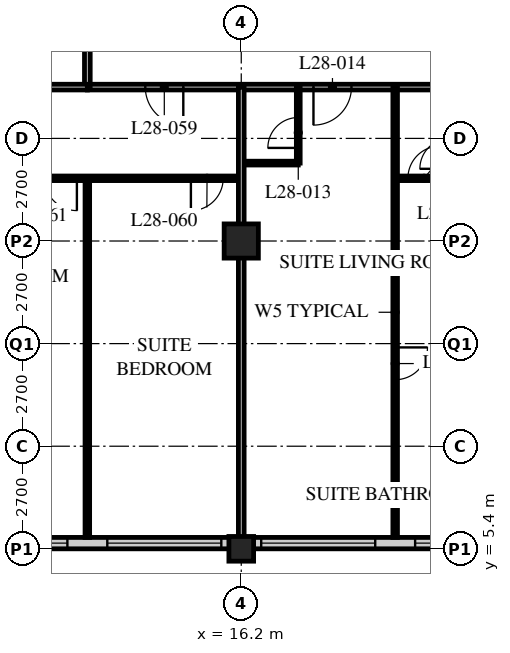
"""IFC4 building model, lengths in metres.
Left out: names, types, materials, properties, quantities, classifications, styles, units other than length and angle.
Written with IfcOpenShell. Run it as: python <this file> out.ifc"""

import sys

from ifc_helpers import new_model, si_unit, direction, frame, frame_2d, origin, origin_2d, place, context, subcontext, project, spatial, rectangle, hollow_rectangle, extrude, element, fill, save


model = new_model("IFC4")
c1 = context("Model", 3, precision=1e-05, world=origin(), true_north=direction((0.0, 1.0)))
c2 = subcontext(c1, "Body", "Model", "MODEL_VIEW")
j1 = project(units=[si_unit("LENGTHUNIT", "METRE"), si_unit("PLANEANGLEUNIT", "RADIAN")], contexts=[c1])
p1 = place(None, origin())
s1 = spatial("IfcSite", under=j1, at=p1, CompositionType="ELEMENT")
p2 = place(p1, origin())
s2 = spatial("IfcBuilding", under=s1, at=p2, CompositionType="ELEMENT")
p3 = place(p2, frame((0.0, 0.0, 113.6)))
s3 = spatial("IfcBuildingStorey", under=s2, at=p3, CompositionType="ELEMENT", Elevation=113.6)
p4 = place(p3, frame((16.2, 5.4, 0.0), z_axis=(0.0, 0.0, 1.0), x_axis=(1.0, 0.0, 0.0)))
e1 = element("IfcColumn", 1, at=p4, inside=s3, PredefinedType="COLUMN", context=c2, shape_type="SweptSolid", body=[
    extrude(hollow_rectangle(XDim=0.65, YDim=0.65, WallThickness=0.055, at=origin_2d()), origin(), (0.0, 0.0, 1.0), 3.4),
])
p5 = place(p3, frame((16.2, 13.5, 0.0), z_axis=(0.0, 0.0, 1.0), x_axis=(1.0, 0.0, 0.0)))
e2 = element("IfcColumn", 2, at=p5, inside=s3, PredefinedType="COLUMN", context=c2, shape_type="SweptSolid", body=[
    extrude(hollow_rectangle(XDim=0.9, YDim=0.9, WallThickness=0.09, at=origin_2d()), origin(), (0.0, 0.0, 1.0), 3.4),
])
p6 = place(p3, frame((8.4, 5.55, 0.0), z_axis=(0.0, 0.0, 1.0), x_axis=(1.0, 0.0, 0.0)))
e3 = element("IfcWall", 3, at=p6, inside=s3, PredefinedType="SOLIDWALL", context=c2, shape_type="SweptSolid", body=[
    extrude(rectangle(XDim=40.2, YDim=0.3, at=frame_2d((20.1, 0.0))), origin(), (0.0, 0.0, 1.0), 3.19),
])
p7 = place(p6, frame((0.225, 0.0, 0.9)))
e4 = element("IfcOpeningElement", 4, at=p7, cuts=e3, PredefinedType="OPENING", context=c2, shape_type="SweptSolid", body=[
    extrude(rectangle(XDim=3.0, YDim=2.0, at=frame_2d((1.5, 1.0))), frame((0.0, 0.16, 0.0), z_axis=(0.0, -1.0, 0.0), x_axis=(1.0, 0.0, 0.0)), (0.0, 0.0, 1.0), 0.32),
])
p8 = place(p6, frame((4.275, 0.0, 0.9)))
e5 = element("IfcOpeningElement", 5, at=p8, cuts=e3, PredefinedType="OPENING", context=c2, shape_type="SweptSolid", body=[
    extrude(rectangle(XDim=3.0, YDim=2.0, at=frame_2d((1.5, 1.0))), frame((0.0, 0.16, 0.0), z_axis=(0.0, -1.0, 0.0), x_axis=(1.0, 0.0, 0.0)), (0.0, 0.0, 1.0), 0.32),
])
p9 = place(p6, frame((8.325, 0.0, 0.9)))
e6 = element("IfcOpeningElement", 6, at=p9, cuts=e3, PredefinedType="OPENING", context=c2, shape_type="SweptSolid", body=[
    extrude(rectangle(XDim=3.0, YDim=2.0, at=frame_2d((1.5, 1.0))), frame((0.0, 0.16, 0.0), z_axis=(0.0, -1.0, 0.0), x_axis=(1.0, 0.0, 0.0)), (0.0, 0.0, 1.0), 0.32),
])
p10 = place(p6, frame((12.375, 0.0, 0.9)))
e7 = element("IfcOpeningElement", 7, at=p10, cuts=e3, PredefinedType="OPENING", context=c2, shape_type="SweptSolid", body=[
    extrude(rectangle(XDim=3.0, YDim=2.0, at=frame_2d((1.5, 1.0))), frame((0.0, 0.16, 0.0), z_axis=(0.0, -1.0, 0.0), x_axis=(1.0, 0.0, 0.0)), (0.0, 0.0, 1.0), 0.32),
])
p11 = place(p6, frame((16.425, 0.0, 0.9)))
e8 = element("IfcOpeningElement", 8, at=p11, cuts=e3, PredefinedType="OPENING", context=c2, shape_type="SweptSolid", body=[
    extrude(rectangle(XDim=3.0, YDim=2.0, at=frame_2d((1.5, 1.0))), frame((0.0, 0.16, 0.0), z_axis=(0.0, -1.0, 0.0), x_axis=(1.0, 0.0, 0.0)), (0.0, 0.0, 1.0), 0.32),
])
p12 = place(p6, frame((20.475, 0.0, 0.9)))
e9 = element("IfcOpeningElement", 9, at=p12, cuts=e3, PredefinedType="OPENING", context=c2, shape_type="SweptSolid", body=[
    extrude(rectangle(XDim=3.0, YDim=2.0, at=frame_2d((1.5, 1.0))), frame((0.0, 0.16, 0.0), z_axis=(0.0, -1.0, 0.0), x_axis=(1.0, 0.0, 0.0)), (0.0, 0.0, 1.0), 0.32),
])
p13 = place(p6, frame((24.525, 0.0, 0.9)))
e10 = element("IfcOpeningElement", 10, at=p13, cuts=e3, PredefinedType="OPENING", context=c2, shape_type="SweptSolid", body=[
    extrude(rectangle(XDim=3.0, YDim=2.0, at=frame_2d((1.5, 1.0))), frame((0.0, 0.16, 0.0), z_axis=(0.0, -1.0, 0.0), x_axis=(1.0, 0.0, 0.0)), (0.0, 0.0, 1.0), 0.32),
])
p14 = place(p6, frame((28.575, 0.0, 0.9)))
e11 = element("IfcOpeningElement", 11, at=p14, cuts=e3, PredefinedType="OPENING", context=c2, shape_type="SweptSolid", body=[
    extrude(rectangle(XDim=3.0, YDim=2.0, at=frame_2d((1.5, 1.0))), frame((0.0, 0.16, 0.0), z_axis=(0.0, -1.0, 0.0), x_axis=(1.0, 0.0, 0.0)), (0.0, 0.0, 1.0), 0.32),
])
p15 = place(p6, frame((32.625, 0.0, 0.9)))
e12 = element("IfcOpeningElement", 12, at=p15, cuts=e3, PredefinedType="OPENING", context=c2, shape_type="SweptSolid", body=[
    extrude(rectangle(XDim=3.0, YDim=2.0, at=frame_2d((1.5, 1.0))), frame((0.0, 0.16, 0.0), z_axis=(0.0, -1.0, 0.0), x_axis=(1.0, 0.0, 0.0)), (0.0, 0.0, 1.0), 0.32),
])
p16 = place(p6, frame((36.675, 0.0, 0.9)))
e13 = element("IfcOpeningElement", 13, at=p16, cuts=e3, PredefinedType="OPENING", context=c2, shape_type="SweptSolid", body=[
    extrude(rectangle(XDim=3.0, YDim=2.0, at=frame_2d((1.5, 1.0))), frame((0.0, 0.16, 0.0), z_axis=(0.0, -1.0, 0.0), x_axis=(1.0, 0.0, 0.0)), (0.0, 0.0, 1.0), 0.32),
])
p17 = place(p3, frame((12.15, 17.55, 0.0), z_axis=(0.0, 0.0, 1.0), x_axis=(1.0, 0.0, 0.0)))
e14 = element("IfcWall", 14, at=p17, inside=s3, PredefinedType="PARTITIONING", context=c2, shape_type="SweptSolid", body=[
    extrude(rectangle(XDim=32.4, YDim=0.15, at=frame_2d((16.2, 0.0))), origin(), (0.0, 0.0, 1.0), 3.19),
])
p18 = place(p17, frame((5.95, 0.0, 0.0)))
e15 = element("IfcOpeningElement", 15, at=p18, cuts=e14, PredefinedType="OPENING", context=c2, shape_type="SweptSolid", body=[
    extrude(rectangle(XDim=1.0, YDim=2.1, at=frame_2d((0.5, 1.05))), frame((0.0, 0.085, 0.0), z_axis=(0.0, -1.0, 0.0), x_axis=(1.0, 0.0, 0.0)), (0.0, 0.0, 1.0), 0.17),
])
p19 = place(p17, frame((17.725, 0.0, 0.0)))
e16 = element("IfcOpeningElement", 16, at=p19, cuts=e14, PredefinedType="OPENING", context=c2, shape_type="SweptSolid", body=[
    extrude(rectangle(XDim=1.0, YDim=2.1, at=frame_2d((0.5, 1.05))), frame((0.0, 0.085, 0.0), z_axis=(0.0, -1.0, 0.0), x_axis=(1.0, 0.0, 0.0)), (0.0, 0.0, 1.0), 0.17),
])
p20 = place(p17, frame((26.75, 0.0, 0.0)))
e17 = element("IfcOpeningElement", 17, at=p20, cuts=e14, PredefinedType="OPENING", context=c2, shape_type="SweptSolid", body=[
    extrude(rectangle(XDim=1.0, YDim=2.1, at=frame_2d((0.5, 1.05))), frame((0.0, 0.085, 0.0), z_axis=(0.0, -1.0, 0.0), x_axis=(1.0, 0.0, 0.0)), (0.0, 0.0, 1.0), 0.17),
])
p21 = place(p17, frame((1.525, 0.0, 0.0)))
e18 = element("IfcOpeningElement", 18, at=p21, cuts=e14, PredefinedType="OPENING", context=c2, shape_type="SweptSolid", body=[
    extrude(rectangle(XDim=1.0, YDim=2.1, at=frame_2d((0.5, 1.05))), frame((0.0, 0.085, 0.0), z_axis=(0.0, -1.0, 0.0), x_axis=(1.0, 0.0, 0.0)), (0.0, 0.0, 1.0), 0.17),
])
p22 = place(p17, frame((29.875, 0.0, 0.0)))
e19 = element("IfcOpeningElement", 19, at=p22, cuts=e14, PredefinedType="OPENING", context=c2, shape_type="SweptSolid", body=[
    extrude(rectangle(XDim=1.0, YDim=2.1, at=frame_2d((0.5, 1.05))), frame((0.0, 0.085, 0.0), z_axis=(0.0, -1.0, 0.0), x_axis=(1.0, 0.0, 0.0)), (0.0, 0.0, 1.0), 0.17),
])
p23 = place(p3, frame((12.15, 17.55, 0.0), z_axis=(0.0, 0.0, 1.0), x_axis=(0.0, 1.0, 0.0)))
e20 = element("IfcWall", 20, at=p23, inside=s3, PredefinedType="PARTITIONING", context=c2, shape_type="SweptSolid", body=[
    extrude(rectangle(XDim=28.35, YDim=0.15, at=frame_2d((14.175, 0.0))), origin(), (0.0, 0.0, 1.0), 3.19),
])
p24 = place(p23, frame((5.45, 0.0, 0.0)))
e21 = element("IfcOpeningElement", 21, at=p24, cuts=e20, PredefinedType="OPENING", context=c2, shape_type="SweptSolid", body=[
    extrude(rectangle(XDim=1.0, YDim=2.1, at=frame_2d((0.5, 1.05))), frame((0.0, 0.085, 0.0), z_axis=(0.0, -1.0, 0.0), x_axis=(1.0, 0.0, 0.0)), (0.0, 0.0, 1.0), 0.17),
])
p25 = place(p23, frame((13.55, 0.0, 0.0)))
e22 = element("IfcOpeningElement", 22, at=p25, cuts=e20, PredefinedType="OPENING", context=c2, shape_type="SweptSolid", body=[
    extrude(rectangle(XDim=1.0, YDim=2.1, at=frame_2d((0.5, 1.05))), frame((0.0, 0.085, 0.0), z_axis=(0.0, -1.0, 0.0), x_axis=(1.0, 0.0, 0.0)), (0.0, 0.0, 1.0), 0.17),
])
p26 = place(p23, frame((21.65, 0.0, 0.0)))
e23 = element("IfcOpeningElement", 23, at=p26, cuts=e20, PredefinedType="OPENING", context=c2, shape_type="SweptSolid", body=[
    extrude(rectangle(XDim=1.0, YDim=2.1, at=frame_2d((0.5, 1.05))), frame((0.0, 0.085, 0.0), z_axis=(0.0, -1.0, 0.0), x_axis=(1.0, 0.0, 0.0)), (0.0, 0.0, 1.0), 0.17),
])
p27 = place(p23, frame((26.75, 0.0, 0.0)))
e24 = element("IfcOpeningElement", 24, at=p27, cuts=e20, PredefinedType="OPENING", context=c2, shape_type="SweptSolid", body=[
    extrude(rectangle(XDim=1.0, YDim=2.1, at=frame_2d((0.5, 1.05))), frame((0.0, 0.085, 0.0), z_axis=(0.0, -1.0, 0.0), x_axis=(1.0, 0.0, 0.0)), (0.0, 0.0, 1.0), 0.17),
])
p28 = place(p3, frame((16.2, 15.55, 0.0), z_axis=(0.0, 0.0, 1.0), x_axis=(1.0, 0.0, 0.0)))
e25 = element("IfcWall", 25, at=p28, inside=s3, PredefinedType="PARTITIONING", context=c2, shape_type="SweptSolid", body=[
    extrude(rectangle(XDim=1.5, YDim=0.1, at=frame_2d((0.75, 0.0))), origin(), (0.0, 0.0, 1.0), 3.19),
])
p29 = place(p3, frame((17.7, 17.55, 0.0), z_axis=(0.0, 0.0, 1.0), x_axis=(0.0, -1.0, 0.0)))
e26 = element("IfcWall", 26, at=p29, inside=s3, PredefinedType="PARTITIONING", context=c2, shape_type="SweptSolid", body=[
    extrude(rectangle(XDim=2.0, YDim=0.1, at=frame_2d((1.0, 0.0))), origin(), (0.0, 0.0, 1.0), 3.19),
])
p30 = place(p29, frame((0.8, 0.0, 0.0)))
e27 = element("IfcOpeningElement", 27, at=p30, cuts=e26, PredefinedType="OPENING", context=c2, shape_type="SweptSolid", body=[
    extrude(rectangle(XDim=0.8, YDim=2.1, at=frame_2d((0.4, 1.05))), frame((0.0, 0.06, 0.0), z_axis=(0.0, -1.0, 0.0), x_axis=(1.0, 0.0, 0.0)), (0.0, 0.0, 1.0), 0.12),
])
p31 = place(p3, frame((20.25, 17.55, 0.0), z_axis=(0.0, 0.0, 1.0), x_axis=(0.0, -1.0, 0.0)))
e28 = element("IfcWall", 28, at=p31, inside=s3, PredefinedType="PARTITIONING", context=c2, shape_type="SweptSolid", body=[
    extrude(rectangle(XDim=11.85, YDim=0.12, at=frame_2d((5.925, 0.0))), origin(), (0.0, 0.0, 1.0), 3.19),
])
p32 = place(p31, frame((6.85, 0.0, 0.0)))
e29 = element("IfcOpeningElement", 29, at=p32, cuts=e28, PredefinedType="OPENING", context=c2, shape_type="SweptSolid", body=[
    extrude(rectangle(XDim=0.85, YDim=2.1, at=frame_2d((0.425, 1.05))), frame((0.0, 0.07, 0.0), z_axis=(0.0, -1.0, 0.0), x_axis=(1.0, 0.0, 0.0)), (0.0, 0.0, 1.0), 0.14),
])
p33 = place(p3, frame((8.15, 15.15, 0.0), z_axis=(0.0, 0.0, 1.0), x_axis=(1.0, 0.0, 0.0)))
e30 = element("IfcWall", 30, at=p33, inside=s3, PredefinedType="PARTITIONING", context=c2, shape_type="SweptSolid", body=[
    extrude(rectangle(XDim=8.05, YDim=0.12, at=frame_2d((4.025, 0.0))), origin(), (0.0, 0.0, 1.0), 3.19),
])
p34 = place(p33, frame((6.725, 0.0, 0.0)))
e31 = element("IfcOpeningElement", 31, at=p34, cuts=e30, PredefinedType="OPENING", context=c2, shape_type="SweptSolid", body=[
    extrude(rectangle(XDim=0.85, YDim=2.1, at=frame_2d((0.425, 1.05))), frame((0.0, 0.07, 0.0), z_axis=(0.0, -1.0, 0.0), x_axis=(1.0, 0.0, 0.0)), (0.0, 0.0, 1.0), 0.14),
])
p35 = place(p33, frame((2.875, 0.0, 0.0)))
e32 = element("IfcOpeningElement", 32, at=p35, cuts=e30, PredefinedType="OPENING", context=c2, shape_type="SweptSolid", body=[
    extrude(rectangle(XDim=0.85, YDim=2.1, at=frame_2d((0.425, 1.05))), frame((0.0, 0.07, 0.0), z_axis=(0.0, -1.0, 0.0), x_axis=(1.0, 0.0, 0.0)), (0.0, 0.0, 1.0), 0.14),
])
p36 = place(p3, frame((12.15, 15.15, 0.0), z_axis=(0.0, 0.0, 1.0), x_axis=(0.0, -1.0, 0.0)))
e33 = element("IfcWall", 33, at=p36, inside=s3, PredefinedType="PARTITIONING", context=c2, shape_type="SweptSolid", body=[
    extrude(rectangle(XDim=9.45, YDim=0.12, at=frame_2d((4.725, 0.0))), origin(), (0.0, 0.0, 1.0), 3.19),
])
p37 = place(p3, frame((0.3, 17.55, 0.0), z_axis=(0.0, 0.0, 1.0), x_axis=(1.0, 0.0, 0.0)))
e34 = element("IfcWall", 34, at=p37, inside=s3, PredefinedType="PARTITIONING", context=c2, shape_type="SweptSolid", body=[
    extrude(rectangle(XDim=11.85, YDim=0.15, at=frame_2d((5.925, 0.0))), origin(), (0.0, 0.0, 1.0), 3.19),
])
p38 = place(p3, frame((16.2, 17.55, 0.0), z_axis=(0.0, 0.0, 1.0), x_axis=(0.0, -1.0, 0.0)))
e35 = element("IfcWall", 35, at=p38, inside=s3, PredefinedType="PARTITIONING", context=c2, shape_type="SweptSolid", body=[
    extrude(rectangle(XDim=11.85, YDim=0.15, at=frame_2d((5.925, 0.0))), origin(), (0.0, 0.0, 1.0), 2.578),
])
p39 = place(p3, frame((21.71, 15.15, 0.0), z_axis=(0.0, 0.0, 1.0), x_axis=(-1.0, 0.0, 0.0)))
e36 = element("IfcWall", 36, at=p39, inside=s3, PredefinedType="PARTITIONING", context=c2, shape_type="SweptSolid", body=[
    extrude(rectangle(XDim=1.46, YDim=0.12, at=frame_2d((0.73, 0.0))), origin(), (0.0, 0.0, 1.0), 3.19),
])
p40 = place(p39, frame((0.275, 0.0, 0.0)))
e37 = element("IfcOpeningElement", 37, at=p40, cuts=e36, PredefinedType="OPENING", context=c2, shape_type="SweptSolid", body=[
    extrude(rectangle(XDim=0.85, YDim=2.1, at=frame_2d((0.425, 1.05))), frame((0.0, 0.07, 0.0), z_axis=(0.0, -1.0, 0.0), x_axis=(1.0, 0.0, 0.0)), (0.0, 0.0, 1.0), 0.14),
])
p41 = place(p7, origin())
e38 = element("IfcWindow", 38, at=p41, inside=s3, PartitioningType="SINGLE_PANEL", PredefinedType="WINDOW", context=c2, shape_type="SweptSolid", body=[
    extrude(rectangle(XDim=3.0, YDim=2.0, at=frame_2d((1.5, 1.0))), frame((0.0, 0.03, 0.0), z_axis=(0.0, -1.0, 0.0), x_axis=(1.0, 0.0, 0.0)), (0.0, 0.0, 1.0), 0.06),
])
fill(e4, e38)
p42 = place(p8, origin())
e39 = element("IfcWindow", 39, at=p42, inside=s3, PartitioningType="SINGLE_PANEL", PredefinedType="WINDOW", context=c2, shape_type="SweptSolid", body=[
    extrude(rectangle(XDim=3.0, YDim=2.0, at=frame_2d((1.5, 1.0))), frame((0.0, 0.03, 0.0), z_axis=(0.0, -1.0, 0.0), x_axis=(1.0, 0.0, 0.0)), (0.0, 0.0, 1.0), 0.06),
])
fill(e5, e39)
p43 = place(p9, origin())
e40 = element("IfcWindow", 40, at=p43, inside=s3, PartitioningType="SINGLE_PANEL", PredefinedType="WINDOW", context=c2, shape_type="SweptSolid", body=[
    extrude(rectangle(XDim=3.0, YDim=2.0, at=frame_2d((1.5, 1.0))), frame((0.0, 0.03, 0.0), z_axis=(0.0, -1.0, 0.0), x_axis=(1.0, 0.0, 0.0)), (0.0, 0.0, 1.0), 0.06),
])
fill(e6, e40)
p44 = place(p10, origin())
e41 = element("IfcWindow", 41, at=p44, inside=s3, PartitioningType="SINGLE_PANEL", PredefinedType="WINDOW", context=c2, shape_type="SweptSolid", body=[
    extrude(rectangle(XDim=3.0, YDim=2.0, at=frame_2d((1.5, 1.0))), frame((0.0, 0.03, 0.0), z_axis=(0.0, -1.0, 0.0), x_axis=(1.0, 0.0, 0.0)), (0.0, 0.0, 1.0), 0.06),
])
fill(e7, e41)
p45 = place(p30, origin())
e42 = element("IfcDoor", 42, at=p45, inside=s3, OperationType="SINGLE_SWING_LEFT", PredefinedType="DOOR", context=c2, shape_type="SweptSolid", body=[
    extrude(rectangle(XDim=0.8, YDim=2.1, at=frame_2d((0.4, 1.05))), frame((0.0, 0.025, 0.0), z_axis=(0.0, -1.0, 0.0), x_axis=(1.0, 0.0, 0.0)), (0.0, 0.0, 1.0), 0.05),
])
fill(e27, e42)
p46 = place(p18, origin())
e43 = element("IfcDoor", 43, at=p46, inside=s3, OperationType="SINGLE_SWING_RIGHT", PredefinedType="DOOR", context=c2, shape_type="SweptSolid", body=[
    extrude(rectangle(XDim=1.0, YDim=2.1, at=frame_2d((0.5, 1.05))), frame((0.0, 0.025, 0.0), z_axis=(0.0, -1.0, 0.0), x_axis=(1.0, 0.0, 0.0)), (0.0, 0.0, 1.0), 0.05),
])
fill(e15, e43)
p47 = place(p32, origin())
e44 = element("IfcDoor", 44, at=p47, inside=s3, OperationType="SINGLE_SWING_LEFT", PredefinedType="DOOR", context=c2, shape_type="SweptSolid", body=[
    extrude(rectangle(XDim=0.85, YDim=2.1, at=frame_2d((0.425, 1.05))), frame((0.0, 0.025, 0.0), z_axis=(0.0, -1.0, 0.0), x_axis=(1.0, 0.0, 0.0)), (0.0, 0.0, 1.0), 0.05),
])
fill(e29, e44)
p48 = place(p21, origin())
e45 = element("IfcDoor", 45, at=p48, inside=s3, OperationType="SINGLE_SWING_LEFT", PredefinedType="DOOR", context=c2, shape_type="SweptSolid", body=[
    extrude(rectangle(XDim=1.0, YDim=2.1, at=frame_2d((0.5, 1.05))), frame((0.0, 0.025, 0.0), z_axis=(0.0, -1.0, 0.0), x_axis=(1.0, 0.0, 0.0)), (0.0, 0.0, 1.0), 0.05),
])
fill(e18, e45)
p49 = place(p34, origin())
e46 = element("IfcDoor", 46, at=p49, inside=s3, OperationType="SINGLE_SWING_RIGHT", PredefinedType="DOOR", context=c2, shape_type="SweptSolid", body=[
    extrude(rectangle(XDim=0.85, YDim=2.1, at=frame_2d((0.425, 1.05))), frame((0.0, 0.025, 0.0), z_axis=(0.0, -1.0, 0.0), x_axis=(1.0, 0.0, 0.0)), (0.0, 0.0, 1.0), 0.05),
])
fill(e31, e46)
p50 = place(p35, origin())
e47 = element("IfcDoor", 47, at=p50, inside=s3, OperationType="SINGLE_SWING_LEFT", PredefinedType="DOOR", context=c2, shape_type="SweptSolid", body=[
    extrude(rectangle(XDim=0.85, YDim=2.1, at=frame_2d((0.425, 1.05))), frame((0.0, 0.025, 0.0), z_axis=(0.0, -1.0, 0.0), x_axis=(1.0, 0.0, 0.0)), (0.0, 0.0, 1.0), 0.05),
])
fill(e32, e47)
p51 = place(p40, origin())
e48 = element("IfcDoor", 48, at=p51, inside=s3, OperationType="SINGLE_SWING_RIGHT", PredefinedType="DOOR", context=c2, shape_type="SweptSolid", body=[
    extrude(rectangle(XDim=0.85, YDim=2.1, at=frame_2d((0.425, 1.05))), frame((0.0, 0.025, 0.0), z_axis=(0.0, -1.0, 0.0), x_axis=(1.0, 0.0, 0.0)), (0.0, 0.0, 1.0), 0.05),
])
fill(e37, e48)
save(model, sys.argv[1])
